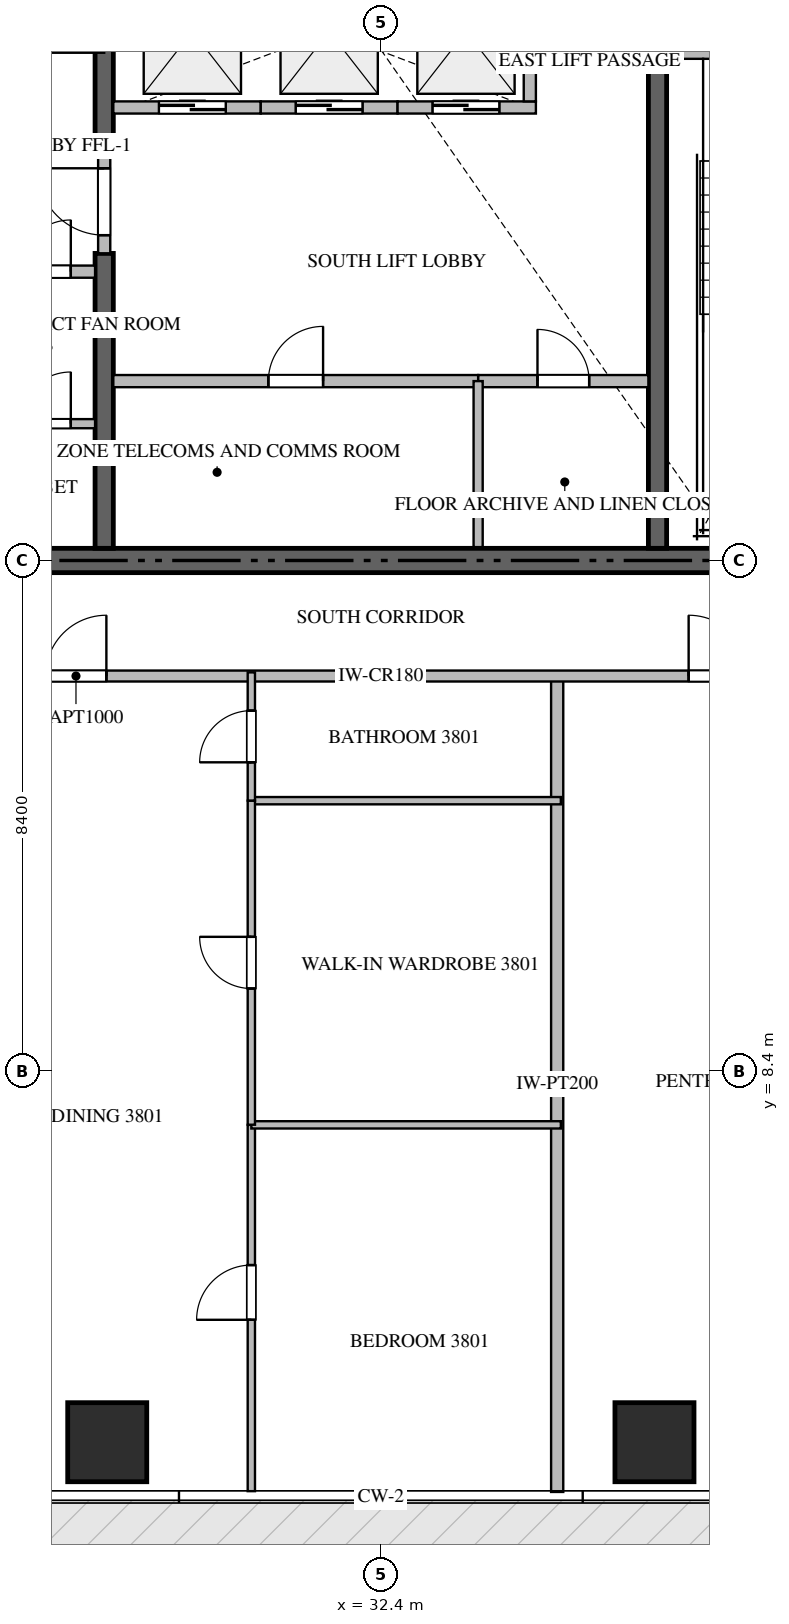
"""IFC4 building model, lengths in metres.
Left out: names, types, materials, properties, quantities, classifications, styles, units other than length and angle.
Written with IfcOpenShell. Run it as: python <this file> out.ifc"""

import sys

from ifc_helpers import new_model, si_unit, direction, frame, frame_2d, origin, origin_2d, place, context, subcontext, project, spatial, rectangle, extrude, source, transform, mapped, element, fill, save


model = new_model("IFC4")
c1 = context("Model", 3, precision=1e-05, world=origin(), true_north=direction((0.0, 1.0)))
c2 = subcontext(c1, "Body", "Model", "MODEL_VIEW")
j1 = project(units=[si_unit("LENGTHUNIT", "METRE"), si_unit("PLANEANGLEUNIT", "RADIAN")], contexts=[c1])
p1 = place(None, origin())
s1 = spatial("IfcSite", under=j1, at=p1, CompositionType="ELEMENT")
p2 = place(p1, origin())
s2 = spatial("IfcBuilding", under=s1, at=p2, CompositionType="ELEMENT")
p3 = place(p2, frame((0.0, 0.0, 153.9)))
s3 = spatial("IfcBuildingStorey", under=s2, at=p3, CompositionType="ELEMENT", Elevation=153.9)
p4 = place(p3, frame((23.4, 16.8, -0.26), z_axis=(0.0, 0.0, 1.0), x_axis=(1.0, 0.0, 0.0)))
e1 = element("IfcWall", 1, at=p4, inside=s3, PredefinedType="SHEAR", context=c2, shape_type="SweptSolid", body=[
    extrude(rectangle(XDim=18.0, YDim=0.4, at=frame_2d((9.0, 0.0))), origin(), (0.0, 0.0, 1.0), 3.748),
])
p5 = place(p3, frame((27.85, 17.0, -0.26), z_axis=(0.0, 0.0, 1.0), x_axis=(0.0, 1.0, 0.0)))
e2 = element("IfcWall", 2, at=p5, inside=s3, PredefinedType="SHEAR", context=c2, shape_type="SweptSolid", body=[
    extrude(rectangle(XDim=4.85, YDim=0.3, at=frame_2d((2.425, 0.0))), origin(), (0.0, 0.0, 1.0), 3.748),
])
p6 = place(p3, frame((27.85, 23.55, -0.26), z_axis=(0.0, 0.0, 1.0), x_axis=(0.0, 1.0, 0.0)))
e3 = element("IfcWall", 3, at=p6, inside=s3, PredefinedType="SHEAR", context=c2, shape_type="SweptSolid", body=[
    extrude(rectangle(XDim=9.85, YDim=0.3, at=frame_2d((4.925, 0.0))), origin(), (0.0, 0.0, 1.0), 3.748),
])
p7 = place(p3, frame((36.95, 17.0, -0.26), z_axis=(0.0, 0.0, 1.0), x_axis=(0.0, 1.0, 0.0)))
e4 = element("IfcWall", 4, at=p7, inside=s3, PredefinedType="SHEAR", context=c2, shape_type="SweptSolid", body=[
    extrude(rectangle(XDim=8.35, YDim=0.3, at=frame_2d((4.175, 0.0))), origin(), (0.0, 0.0, 1.0), 3.748),
])
m1 = source(origin(), c2, "Body", "SweptSolid", [
    extrude(rectangle(XDim=1.3, YDim=1.3, at=origin_2d()), origin(), (0.0, 0.0, 1.0), 3.75),
])
for number, where, z_axis, x_axis in (
    (5, (27.9, 2.3, -0.26), (0.0, 0.0, 1.0), (1.0, 0.0, 0.0)),
    (6, (36.9, 2.3, -0.26), (0.0, 0.0, 1.0), (1.0, 0.0, 0.0)),
):
    element("IfcColumn", number, at=place(p3, frame(where, z_axis=z_axis, x_axis=x_axis)), inside=s3, PredefinedType="COLUMN", context=c2, shape_type="MappedRepresentation", body=[
        mapped(m1, transform((0.0, 0.0, 0.0), scale=1.0)),
    ])
p8 = place(p3, frame((36.95, 25.15, 0.0), z_axis=(0.0, 0.0, 1.0), x_axis=(1.0, 0.0, 0.0)))
e7 = element("IfcWall", 7, at=p8, inside=s3, PredefinedType="STANDARD", context=c2, shape_type="SweptSolid", body=[
    extrude(rectangle(XDim=4.45, YDim=0.2, at=frame_2d((2.225, 0.0))), origin(), (0.0, 0.0, 1.0), 3.49),
])
p9 = place(p8, frame((1.65, 0.0, 0.0)))
e8 = element("IfcOpeningElement", 8, at=p9, cuts=e7, PredefinedType="OPENING", context=c2, shape_type="SweptSolid", body=[
    extrude(rectangle(XDim=1.1, YDim=2.15, at=frame_2d((0.55, 1.075))), frame((0.0, 0.11, 0.0), z_axis=(0.0, -1.0, 0.0), x_axis=(1.0, 0.0, 0.0)), (0.0, 0.0, 1.0), 0.22),
])
p10 = place(p3, frame((28.0, 24.25, 0.0), z_axis=(0.0, 0.0, 1.0), x_axis=(1.0, 0.0, 0.0)))
e9 = element("IfcWall", 9, at=p10, inside=s3, PredefinedType="STANDARD", context=c2, shape_type="SweptSolid", body=[
    extrude(rectangle(XDim=2.425, YDim=0.2, at=frame_2d((1.212, 0.0))), origin(), (0.0, 0.0, 1.0), 3.49),
])
p11 = place(p10, frame((0.75, 0.0, 0.0)))
e10 = element("IfcOpeningElement", 10, at=p11, cuts=e9, PredefinedType="OPENING", context=c2, shape_type="SweptSolid", body=[
    extrude(rectangle(XDim=1.1, YDim=2.2, at=frame_2d((0.55, 1.1))), frame((0.0, 0.11, 0.0), z_axis=(0.0, -1.0, 0.0), x_axis=(1.0, 0.0, 0.0)), (0.0, 0.0, 1.0), 0.22),
])
p12 = place(p3, frame((30.425, 24.25, 0.0), z_axis=(0.0, 0.0, 1.0), x_axis=(1.0, 0.0, 0.0)))
e11 = element("IfcWall", 11, at=p12, inside=s3, PredefinedType="STANDARD", context=c2, shape_type="SweptSolid", body=[
    extrude(rectangle(XDim=2.25, YDim=0.2, at=frame_2d((1.125, 0.0))), origin(), (0.0, 0.0, 1.0), 3.49),
])
p13 = place(p12, frame((0.575, 0.0, 0.0)))
e12 = element("IfcOpeningElement", 12, at=p13, cuts=e11, PredefinedType="OPENING", context=c2, shape_type="SweptSolid", body=[
    extrude(rectangle(XDim=1.1, YDim=2.2, at=frame_2d((0.55, 1.1))), frame((0.0, 0.11, 0.0), z_axis=(0.0, -1.0, 0.0), x_axis=(1.0, 0.0, 0.0)), (0.0, 0.0, 1.0), 0.22),
])
p14 = place(p3, frame((32.675, 24.25, 0.0), z_axis=(0.0, 0.0, 1.0), x_axis=(1.0, 0.0, 0.0)))
e13 = element("IfcWall", 13, at=p14, inside=s3, PredefinedType="STANDARD", context=c2, shape_type="SweptSolid", body=[
    extrude(rectangle(XDim=2.275, YDim=0.2, at=frame_2d((1.137, 0.0))), origin(), (0.0, 0.0, 1.0), 3.49),
])
p15 = place(p14, frame((0.575, 0.0, 0.0)))
e14 = element("IfcOpeningElement", 14, at=p15, cuts=e13, PredefinedType="OPENING", context=c2, shape_type="SweptSolid", body=[
    extrude(rectangle(XDim=1.1, YDim=2.2, at=frame_2d((0.55, 1.1))), frame((0.0, 0.11, 0.0), z_axis=(0.0, -1.0, 0.0), x_axis=(1.0, 0.0, 0.0)), (0.0, 0.0, 1.0), 0.22),
])
p16 = place(p3, frame((34.85, 24.35, 0.0), z_axis=(0.0, 0.0, 1.0), x_axis=(0.0, 1.0, 0.0)))
e15 = element("IfcWall", 15, at=p16, inside=s3, PredefinedType="STANDARD", context=c2, shape_type="SweptSolid", body=[
    extrude(rectangle(XDim=2.5, YDim=0.2, at=frame_2d((1.25, 0.0))), origin(), (0.0, 0.0, 1.0), 3.49),
])
p17 = place(p3, frame((26.052, 21.55, 0.0), z_axis=(0.0, 0.0, 1.0), x_axis=(1.0, 0.0, 0.0)))
e16 = element("IfcWall", 16, at=p17, inside=s3, PredefinedType="STANDARD", context=c2, shape_type="SweptSolid", body=[
    extrude(rectangle(XDim=1.648, YDim=0.2, at=frame_2d((0.824, 0.0))), origin(), (0.0, 0.0, 1.0), 3.49),
])
p18 = place(p17, frame((0.399, 0.0, 0.0)))
e17 = element("IfcOpeningElement", 17, at=p18, cuts=e16, PredefinedType="OPENING", context=c2, shape_type="SweptSolid", body=[
    extrude(rectangle(XDim=0.85, YDim=2.1, at=frame_2d((0.425, 1.05))), frame((0.0, 0.11, 0.0), z_axis=(0.0, -1.0, 0.0), x_axis=(1.0, 0.0, 0.0)), (0.0, 0.0, 1.0), 0.22),
])
p19 = place(p3, frame((27.85, 21.852, 0.0), z_axis=(0.0, 0.0, 1.0), x_axis=(0.0, 1.0, 0.0)))
e18 = element("IfcWall", 18, at=p19, inside=s3, PredefinedType="STANDARD", context=c2, shape_type="SweptSolid", body=[
    extrude(rectangle(XDim=1.696, YDim=0.2, at=frame_2d((0.848, 0.0))), origin(), (0.0, 0.0, 1.0), 3.49),
])
p20 = place(p19, frame((0.298, 0.0, 0.0)))
e19 = element("IfcOpeningElement", 19, at=p20, cuts=e18, PredefinedType="OPENING", context=c2, shape_type="SweptSolid", body=[
    extrude(rectangle(XDim=1.1, YDim=2.15, at=frame_2d((0.55, 1.075))), frame((0.0, 0.11, 0.0), z_axis=(0.0, -1.0, 0.0), x_axis=(1.0, 0.0, 0.0)), (0.0, 0.0, 1.0), 0.22),
])
p21 = place(p3, frame((26.052, 19.05, 0.0), z_axis=(0.0, 0.0, 1.0), x_axis=(1.0, 0.0, 0.0)))
e20 = element("IfcWall", 20, at=p21, inside=s3, PredefinedType="PARTITIONING", context=c2, shape_type="SweptSolid", body=[
    extrude(rectangle(XDim=1.648, YDim=0.15, at=frame_2d((0.824, 0.0))), origin(), (0.0, 0.0, 1.0), 3.49),
])
p22 = place(p21, frame((0.399, 0.0, 0.0)))
e21 = element("IfcOpeningElement", 21, at=p22, cuts=e20, PredefinedType="OPENING", context=c2, shape_type="SweptSolid", body=[
    extrude(rectangle(XDim=0.85, YDim=2.1, at=frame_2d((0.425, 1.05))), frame((0.0, 0.085, 0.0), z_axis=(0.0, -1.0, 0.0), x_axis=(1.0, 0.0, 0.0)), (0.0, 0.0, 1.0), 0.17),
])
p23 = place(p3, frame((28.0, 19.75, 0.0), z_axis=(0.0, 0.0, 1.0), x_axis=(1.0, 0.0, 0.0)))
e22 = element("IfcWall", 22, at=p23, inside=s3, PredefinedType="STANDARD", context=c2, shape_type="SweptSolid", body=[
    extrude(rectangle(XDim=6.0, YDim=0.2, at=frame_2d((3.0, 0.0))), origin(), (0.0, 0.0, 1.0), 3.49),
])
p24 = place(p23, frame((2.55, 0.0, 0.0)))
e23 = element("IfcOpeningElement", 23, at=p24, cuts=e22, PredefinedType="OPENING", context=c2, shape_type="SweptSolid", body=[
    extrude(rectangle(XDim=0.9, YDim=2.1, at=frame_2d((0.45, 1.05))), frame((0.0, 0.11, 0.0), z_axis=(0.0, -1.0, 0.0), x_axis=(1.0, 0.0, 0.0)), (0.0, 0.0, 1.0), 0.22),
])
p25 = place(p3, frame((34.002, 19.75, 0.0), z_axis=(0.0, 0.0, 1.0), x_axis=(1.0, 0.0, 0.0)))
e24 = element("IfcWall", 24, at=p25, inside=s3, PredefinedType="STANDARD", context=c2, shape_type="SweptSolid", body=[
    extrude(rectangle(XDim=2.798, YDim=0.2, at=frame_2d((1.399, 0.0))), origin(), (0.0, 0.0, 1.0), 3.49),
])
p26 = place(p25, frame((0.974, 0.0, 0.0)))
e25 = element("IfcOpeningElement", 25, at=p26, cuts=e24, PredefinedType="OPENING", context=c2, shape_type="SweptSolid", body=[
    extrude(rectangle(XDim=0.85, YDim=2.1, at=frame_2d((0.425, 1.05))), frame((0.0, 0.11, 0.0), z_axis=(0.0, -1.0, 0.0), x_axis=(1.0, 0.0, 0.0)), (0.0, 0.0, 1.0), 0.22),
])
p27 = place(p3, frame((34.0, 17.02, 0.0), z_axis=(0.0, 0.0, 1.0), x_axis=(0.0, 1.0, 0.0)))
e26 = element("IfcWall", 26, at=p27, inside=s3, PredefinedType="PARTITIONING", context=c2, shape_type="SweptSolid", body=[
    extrude(rectangle(XDim=2.73, YDim=0.15, at=frame_2d((1.365, 0.0))), origin(), (0.0, 0.0, 1.0), 3.49),
])
p28 = place(p3, frame((35.3, 1.482, 0.0), z_axis=(0.0, 0.0, 1.0), x_axis=(0.0, 1.0, 0.0)))
e27 = element("IfcWall", 27, at=p28, inside=s3, PredefinedType="PARTITIONING", context=c2, shape_type="SweptSolid", body=[
    extrude(rectangle(XDim=13.418, YDim=0.2, at=frame_2d((6.709, 0.0))), origin(), (0.0, 0.0, 1.0), 3.49),
])
p29 = place(p3, frame((20.952, 14.9, 0.0), z_axis=(0.0, 0.0, 1.0), x_axis=(1.0, 0.0, 0.0)))
e28 = element("IfcWall", 28, at=p29, inside=s3, PredefinedType="PARTITIONING", context=c2, shape_type="SweptSolid", body=[
    extrude(rectangle(XDim=22.896, YDim=0.18, at=frame_2d((11.448, 0.0))), origin(), (0.0, 0.0, 1.0), 3.49),
])
p30 = place(p29, frame((5.934, 0.0, 0.0)))
e29 = element("IfcOpeningElement", 29, at=p30, cuts=e28, PredefinedType="OPENING", context=c2, shape_type="SweptSolid", body=[
    extrude(rectangle(XDim=1.0, YDim=2.15, at=frame_2d((0.5, 1.075))), frame((0.0, 0.1, 0.0), z_axis=(0.0, -1.0, 0.0), x_axis=(1.0, 0.0, 0.0)), (0.0, 0.0, 1.0), 0.2),
])
p31 = place(p29, frame((16.51, 0.0, 0.0)))
e30 = element("IfcOpeningElement", 30, at=p31, cuts=e28, PredefinedType="OPENING", context=c2, shape_type="SweptSolid", body=[
    extrude(rectangle(XDim=1.0, YDim=2.15, at=frame_2d((0.5, 1.075))), frame((0.0, 0.1, 0.0), z_axis=(0.0, -1.0, 0.0), x_axis=(1.0, 0.0, 0.0)), (0.0, 0.0, 1.0), 0.2),
])
p32 = place(p3, frame((30.27, 1.495, 0.0), z_axis=(0.0, 0.0, 1.0), x_axis=(0.0, 1.0, 0.0)))
e31 = element("IfcWall", 31, at=p32, inside=s3, PredefinedType="PARTITIONING", context=c2, shape_type="SweptSolid", body=[
    extrude(rectangle(XDim=6.024, YDim=0.12, at=frame_2d((3.012, 0.0))), origin(), (0.0, 0.0, 1.0), 3.49),
])
p33 = place(p32, frame((2.818, 0.0, 0.0)))
e32 = element("IfcOpeningElement", 32, at=p33, cuts=e31, PredefinedType="OPENING", context=c2, shape_type="SweptSolid", body=[
    extrude(rectangle(XDim=0.9, YDim=2.1, at=frame_2d((0.45, 1.05))), frame((0.0, 0.07, 0.0), z_axis=(0.0, -1.0, 0.0), x_axis=(1.0, 0.0, 0.0)), (0.0, 0.0, 1.0), 0.14),
])
for number, where, z_axis, x_axis in (
    (33, (30.27, 7.519, 0.0), (0.0, 0.0, 1.0), (1.0, 0.0, 0.0)),
    (34, (30.27, 12.85, 0.0), (0.0, 0.0, 1.0), (1.0, 0.0, 0.0)),
):
    element("IfcWall", number, at=place(p3, frame(where, z_axis=z_axis, x_axis=x_axis)), inside=s3, PredefinedType="PARTITIONING", context=c2, shape_type="SweptSolid", body=[
        extrude(rectangle(XDim=5.09, YDim=0.12, at=frame_2d((2.545, 0.0))), origin(), (0.0, 0.0, 1.0), 3.49),
    ])
p34 = place(p3, frame((30.27, 7.521, 0.0), z_axis=(0.0, 0.0, 1.0), x_axis=(0.0, 1.0, 0.0)))
e35 = element("IfcWall", 35, at=p34, inside=s3, PredefinedType="PARTITIONING", context=c2, shape_type="SweptSolid", body=[
    extrude(rectangle(XDim=5.329, YDim=0.12, at=frame_2d((2.665, 0.0))), origin(), (0.0, 0.0, 1.0), 3.49),
])
p35 = place(p34, frame((2.24, 0.0, 0.0)))
e36 = element("IfcOpeningElement", 36, at=p35, cuts=e35, PredefinedType="OPENING", context=c2, shape_type="SweptSolid", body=[
    extrude(rectangle(XDim=0.85, YDim=2.1, at=frame_2d((0.425, 1.05))), frame((0.0, 0.07, 0.0), z_axis=(0.0, -1.0, 0.0), x_axis=(1.0, 0.0, 0.0)), (0.0, 0.0, 1.0), 0.14),
])
p36 = place(p3, frame((30.27, 12.852, 0.0), z_axis=(0.0, 0.0, 1.0), x_axis=(0.0, 1.0, 0.0)))
e37 = element("IfcWall", 37, at=p36, inside=s3, PredefinedType="PARTITIONING", context=c2, shape_type="SweptSolid", body=[
    extrude(rectangle(XDim=2.108, YDim=0.12, at=frame_2d((1.054, 0.0))), origin(), (0.0, 0.0, 1.0), 3.49),
])
p37 = place(p36, frame((0.629, 0.0, 0.0)))
e38 = element("IfcOpeningElement", 38, at=p37, cuts=e37, PredefinedType="OPENING", context=c2, shape_type="SweptSolid", body=[
    extrude(rectangle(XDim=0.85, YDim=2.1, at=frame_2d((0.425, 1.05))), frame((0.0, 0.07, 0.0), z_axis=(0.0, -1.0, 0.0), x_axis=(1.0, 0.0, 0.0)), (0.0, 0.0, 1.0), 0.14),
])
m2 = source(origin(), c2, "Body", "SweptSolid", [
    extrude(rectangle(XDim=1.1, YDim=2.2, at=frame_2d((0.55, 1.1))), frame((0.0, 0.025, 0.0), z_axis=(0.0, -1.0, 0.0), x_axis=(1.0, 0.0, 0.0)), (0.0, 0.0, 1.0), 0.05),
])
p38 = place(p11, origin())
e39 = element("IfcDoor", 39, at=p38, inside=s3, OperationType="DOUBLE_DOOR_SLIDING", PredefinedType="DOOR", context=c2, shape_type="MappedRepresentation", body=[
    mapped(m2, transform((0.0, 0.0, 0.0), scale=1.0)),
])
fill(e10, e39)
p39 = place(p13, origin())
e40 = element("IfcDoor", 40, at=p39, inside=s3, OperationType="DOUBLE_DOOR_SLIDING", PredefinedType="DOOR", context=c2, shape_type="MappedRepresentation", body=[
    mapped(m2, transform((0.0, 0.0, 0.0), scale=1.0)),
])
fill(e12, e40)
p40 = place(p15, origin())
e41 = element("IfcDoor", 41, at=p40, inside=s3, OperationType="DOUBLE_DOOR_SLIDING", PredefinedType="DOOR", context=c2, shape_type="MappedRepresentation", body=[
    mapped(m2, transform((0.0, 0.0, 0.0), scale=1.0)),
])
fill(e14, e41)
m3 = source(origin(), c2, "Body", "SweptSolid", [
    extrude(rectangle(XDim=0.85, YDim=2.1, at=frame_2d((0.425, 1.05))), frame((0.0, 0.025, 0.0), z_axis=(0.0, -1.0, 0.0), x_axis=(1.0, 0.0, 0.0)), (0.0, 0.0, 1.0), 0.05),
])
p41 = place(p18, origin())
e42 = element("IfcDoor", 42, at=p41, inside=s3, OperationType="SINGLE_SWING_RIGHT", PredefinedType="DOOR", context=c2, shape_type="MappedRepresentation", body=[
    mapped(m3, transform((0.0, 0.0, 0.0), scale=1.0)),
])
fill(e17, e42)
m4 = source(origin(), c2, "Body", "SweptSolid", [
    extrude(rectangle(XDim=1.1, YDim=2.15, at=frame_2d((0.55, 1.075))), frame((0.0, 0.025, 0.0), z_axis=(0.0, -1.0, 0.0), x_axis=(1.0, 0.0, 0.0)), (0.0, 0.0, 1.0), 0.05),
])
p42 = place(p20, origin())
e43 = element("IfcDoor", 43, at=p42, inside=s3, OperationType="SINGLE_SWING_RIGHT", PredefinedType="DOOR", context=c2, shape_type="MappedRepresentation", body=[
    mapped(m4, transform((0.0, 0.0, 0.0), scale=1.0)),
])
fill(e19, e43)
p43 = place(p22, origin())
e44 = element("IfcDoor", 44, at=p43, inside=s3, OperationType="SINGLE_SWING_RIGHT", PredefinedType="DOOR", context=c2, shape_type="MappedRepresentation", body=[
    mapped(m3, transform((0.0, 0.0, 0.0), scale=1.0)),
])
fill(e21, e44)
m5 = source(origin(), c2, "Body", "SweptSolid", [
    extrude(rectangle(XDim=0.9, YDim=2.1, at=frame_2d((0.45, 1.05))), frame((0.0, 0.025, 0.0), z_axis=(0.0, -1.0, 0.0), x_axis=(1.0, 0.0, 0.0)), (0.0, 0.0, 1.0), 0.05),
])
p44 = place(p24, origin())
e45 = element("IfcDoor", 45, at=p44, inside=s3, OperationType="SINGLE_SWING_RIGHT", PredefinedType="DOOR", context=c2, shape_type="MappedRepresentation", body=[
    mapped(m5, transform((0.0, 0.0, 0.0), scale=1.0)),
])
fill(e23, e45)
p45 = place(p26, origin())
e46 = element("IfcDoor", 46, at=p45, inside=s3, OperationType="SINGLE_SWING_LEFT", PredefinedType="DOOR", context=c2, shape_type="MappedRepresentation", body=[
    mapped(m3, transform((0.0, 0.0, 0.0), scale=1.0)),
])
fill(e25, e46)
m6 = source(origin(), c2, "Body", "SweptSolid", [
    extrude(rectangle(XDim=1.0, YDim=2.15, at=frame_2d((0.5, 1.075))), frame((0.0, 0.025, 0.0), z_axis=(0.0, -1.0, 0.0), x_axis=(1.0, 0.0, 0.0)), (0.0, 0.0, 1.0), 0.05),
])
p46 = place(p30, origin())
e47 = element("IfcDoor", 47, at=p46, inside=s3, OperationType="SINGLE_SWING_RIGHT", PredefinedType="DOOR", context=c2, shape_type="MappedRepresentation", body=[
    mapped(m6, transform((0.0, 0.0, 0.0), scale=1.0)),
])
fill(e29, e47)
p47 = place(p31, origin())
e48 = element("IfcDoor", 48, at=p47, inside=s3, OperationType="SINGLE_SWING_LEFT", PredefinedType="DOOR", context=c2, shape_type="MappedRepresentation", body=[
    mapped(m6, transform((0.0, 0.0, 0.0), scale=1.0)),
])
fill(e30, e48)
p48 = place(p33, origin())
e49 = element("IfcDoor", 49, at=p48, inside=s3, OperationType="SINGLE_SWING_LEFT", PredefinedType="DOOR", context=c2, shape_type="MappedRepresentation", body=[
    mapped(m5, transform((0.0, 0.0, 0.0), scale=1.0)),
])
fill(e32, e49)
p49 = place(p35, origin())
e50 = element("IfcDoor", 50, at=p49, inside=s3, OperationType="SINGLE_SWING_RIGHT", PredefinedType="DOOR", context=c2, shape_type="MappedRepresentation", body=[
    mapped(m3, transform((0.0, 0.0, 0.0), scale=1.0)),
])
fill(e36, e50)
p50 = place(p37, origin())
e51 = element("IfcDoor", 51, at=p50, inside=s3, OperationType="SINGLE_SWING_LEFT", PredefinedType="DOOR", context=c2, shape_type="MappedRepresentation", body=[
    mapped(m3, transform((0.0, 0.0, 0.0), scale=1.0)),
])
fill(e38, e51)
save(model, sys.argv[1])
